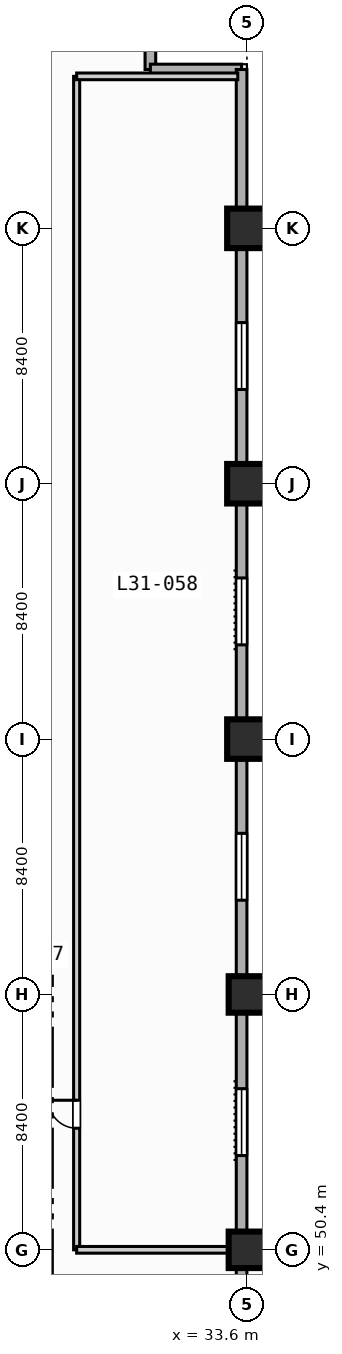
"""IFC4 building model, lengths in metres.
Left out: names, types, materials, properties, quantities, classifications, styles, units other than length and angle.
Written with IfcOpenShell. Run it as: python <this file> out.ifc"""

import sys

from ifc_helpers import new_model, si_unit, direction, frame, frame_2d, origin, origin_2d, place, context, subcontext, project, spatial, rectangle, extrude, element, fill, save


model = new_model("IFC4")
c1 = context("Model", 3, precision=1e-05, world=origin(), true_north=direction((0.0, 1.0)))
c2 = subcontext(c1, "Body", "Model", "MODEL_VIEW")
j1 = project(units=[si_unit("LENGTHUNIT", "METRE"), si_unit("PLANEANGLEUNIT", "RADIAN")], contexts=[c1])
p1 = place(None, origin())
s1 = spatial("IfcSite", under=j1, at=p1, CompositionType="ELEMENT")
p2 = place(p1, origin())
s2 = spatial("IfcBuilding", under=s1, at=p2, CompositionType="ELEMENT")
p3 = place(p2, frame((0.0, 0.0, 130.4)))
s3 = spatial("IfcBuildingStorey", under=s2, at=p3, CompositionType="ELEMENT", Elevation=130.4)
for number, where, z_axis, x_axis in (
    (1, (33.6, 50.4, 0.0), (0.0, 0.0, 1.0), (1.0, 0.0, 0.0)),
    (2, (33.6, 58.8, 0.0), (0.0, 0.0, 1.0), (1.0, 0.0, 0.0)),
):
    element("IfcColumn", number, at=place(p3, frame(where, z_axis=z_axis, x_axis=x_axis)), inside=s3, PredefinedType="COLUMN", context=c2, shape_type="SweptSolid", body=[
        extrude(rectangle(XDim=1.2, YDim=1.2, at=origin_2d()), origin(), (0.0, 0.0, 1.0), 3.8),
    ])
for number, where, z_axis, x_axis in (
    (3, (33.6, 67.2, 0.0), (0.0, 0.0, 1.0), (1.0, 0.0, 0.0)),
    (4, (33.6, 75.6, 0.0), (0.0, 0.0, 1.0), (1.0, 0.0, 0.0)),
    (5, (33.6, 84.0, 0.0), (0.0, 0.0, 1.0), (1.0, 0.0, 0.0)),
):
    element("IfcColumn", number, at=place(p3, frame(where, z_axis=z_axis, x_axis=x_axis)), inside=s3, PredefinedType="COLUMN", context=c2, shape_type="SweptSolid", body=[
        extrude(rectangle(XDim=1.3, YDim=1.3, at=origin_2d()), origin(), (0.0, 0.0, 1.0), 3.8),
    ])
for number, where, z_axis, x_axis in (
    (6, (30.425, 92.225, 0.0), (0.0, 0.0, 1.0), (0.0, -1.0, 0.0)),
    (7, (30.425, 89.225, 0.0), (0.0, 0.0, 1.0), (1.0, 0.0, 0.0)),
):
    element("IfcWall", number, at=place(p3, frame(where, z_axis=z_axis, x_axis=x_axis)), inside=s3, PredefinedType="STANDARD", context=c2, shape_type="SweptSolid", body=[
        extrude(rectangle(XDim=3.0, YDim=0.35, at=frame_2d((1.5, 0.0))), origin(), (0.0, 0.0, 1.0), 3.55),
    ])
p4 = place(p3, frame((33.425, 89.225, 0.0), z_axis=(0.0, 0.0, 1.0), x_axis=(0.0, -1.0, 0.0)))
e8 = element("IfcWall", 8, at=p4, inside=s3, PredefinedType="STANDARD", context=c2, shape_type="SweptSolid", body=[
    extrude(rectangle(XDim=55.8, YDim=0.35, at=frame_2d((27.9, 0.0))), origin(), (0.0, 0.0, 1.0), 3.55),
])
p5 = place(p4, frame((50.325, 0.0, 0.85)))
e9 = element("IfcOpeningElement", 9, at=p5, cuts=e8, PredefinedType="OPENING", context=c2, shape_type="SweptSolid", body=[
    extrude(rectangle(XDim=2.2, YDim=1.8, at=frame_2d((1.1, 0.9))), frame((0.0, 0.185, 0.0), z_axis=(0.0, -1.0, 0.0), x_axis=(1.0, 0.0, 0.0)), (0.0, 0.0, 1.0), 0.37),
])
p6 = place(p4, frame((33.525, 0.0, 0.85)))
e10 = element("IfcOpeningElement", 10, at=p6, cuts=e8, PredefinedType="OPENING", context=c2, shape_type="SweptSolid", body=[
    extrude(rectangle(XDim=2.2, YDim=1.8, at=frame_2d((1.1, 0.9))), frame((0.0, 0.185, 0.0), z_axis=(0.0, -1.0, 0.0), x_axis=(1.0, 0.0, 0.0)), (0.0, 0.0, 1.0), 0.37),
])
p7 = place(p4, frame((25.125, 0.0, 0.85)))
e11 = element("IfcOpeningElement", 11, at=p7, cuts=e8, PredefinedType="OPENING", context=c2, shape_type="SweptSolid", body=[
    extrude(rectangle(XDim=2.2, YDim=1.8, at=frame_2d((1.1, 0.9))), frame((0.0, 0.185, 0.0), z_axis=(0.0, -1.0, 0.0), x_axis=(1.0, 0.0, 0.0)), (0.0, 0.0, 1.0), 0.37),
])
p8 = place(p4, frame((16.725, 0.0, 0.85)))
e12 = element("IfcOpeningElement", 12, at=p8, cuts=e8, PredefinedType="OPENING", context=c2, shape_type="SweptSolid", body=[
    extrude(rectangle(XDim=2.2, YDim=1.8, at=frame_2d((1.1, 0.9))), frame((0.0, 0.185, 0.0), z_axis=(0.0, -1.0, 0.0), x_axis=(1.0, 0.0, 0.0)), (0.0, 0.0, 1.0), 0.37),
])
p9 = place(p4, frame((8.325, 0.0, 0.85)))
e13 = element("IfcOpeningElement", 13, at=p9, cuts=e8, PredefinedType="OPENING", context=c2, shape_type="SweptSolid", body=[
    extrude(rectangle(XDim=2.2, YDim=1.8, at=frame_2d((1.1, 0.9))), frame((0.0, 0.185, 0.0), z_axis=(0.0, -1.0, 0.0), x_axis=(1.0, 0.0, 0.0)), (0.0, 0.0, 1.0), 0.37),
])
p10 = place(p3, frame((28.0, 50.4, 0.0), z_axis=(0.0, 0.0, 1.0), x_axis=(0.0, 1.0, 0.0)))
e14 = element("IfcWall", 14, at=p10, inside=s3, PredefinedType="PARTITIONING", context=c2, shape_type="SweptSolid", body=[
    extrude(rectangle(XDim=38.6, YDim=0.2, at=frame_2d((19.3, 0.0))), origin(), (0.0, 0.0, 1.0), 3.55),
])
p11 = place(p10, frame((4.0, 0.0, 0.0)))
e15 = element("IfcOpeningElement", 15, at=p11, cuts=e14, PredefinedType="OPENING", context=c2, shape_type="SweptSolid", body=[
    extrude(rectangle(XDim=0.92, YDim=2.1, at=frame_2d((0.46, 1.05))), frame((0.0, 0.11, 0.0), z_axis=(0.0, -1.0, 0.0), x_axis=(1.0, 0.0, 0.0)), (0.0, 0.0, 1.0), 0.22),
])
p12 = place(p3, frame((28.0, 50.4, 0.0), z_axis=(0.0, 0.0, 1.0), x_axis=(1.0, 0.0, 0.0)))
e16 = element("IfcWall", 16, at=p12, inside=s3, PredefinedType="PARTITIONING", context=c2, shape_type="SweptSolid", body=[
    extrude(rectangle(XDim=5.3, YDim=0.22, at=frame_2d((2.65, 0.0))), origin(), (0.0, 0.0, 1.0), 2.8),
])
p13 = place(p3, frame((28.0, 89.0, 0.0), z_axis=(0.0, 0.0, 1.0), x_axis=(1.0, 0.0, 0.0)))
e17 = element("IfcWall", 17, at=p13, inside=s3, PredefinedType="PARTITIONING", context=c2, shape_type="SweptSolid", body=[
    extrude(rectangle(XDim=5.3, YDim=0.22, at=frame_2d((2.65, 0.0))), origin(), (0.0, 0.0, 1.0), 3.55),
])
p14 = place(p6, origin())
e18 = element("IfcWindow", 18, at=p14, inside=s3, PartitioningType="SINGLE_PANEL", PredefinedType="WINDOW", context=c2, shape_type="SweptSolid", body=[
    extrude(rectangle(XDim=2.2, YDim=1.8, at=frame_2d((1.1, 0.9))), frame((0.0, 0.03, 0.0), z_axis=(0.0, -1.0, 0.0), x_axis=(1.0, 0.0, 0.0)), (0.0, 0.0, 1.0), 0.06),
])
fill(e10, e18)
p15 = place(p7, origin())
e19 = element("IfcWindow", 19, at=p15, inside=s3, PartitioningType="SINGLE_PANEL", PredefinedType="WINDOW", context=c2, shape_type="SweptSolid", body=[
    extrude(rectangle(XDim=2.2, YDim=1.8, at=frame_2d((1.1, 0.9))), frame((0.0, 0.03, 0.0), z_axis=(0.0, -1.0, 0.0), x_axis=(1.0, 0.0, 0.0)), (0.0, 0.0, 1.0), 0.06),
])
fill(e11, e19)
p16 = place(p8, origin())
e20 = element("IfcWindow", 20, at=p16, inside=s3, PartitioningType="SINGLE_PANEL", PredefinedType="WINDOW", context=c2, shape_type="SweptSolid", body=[
    extrude(rectangle(XDim=2.2, YDim=1.8, at=frame_2d((1.1, 0.9))), frame((0.0, 0.03, 0.0), z_axis=(0.0, -1.0, 0.0), x_axis=(1.0, 0.0, 0.0)), (0.0, 0.0, 1.0), 0.06),
])
fill(e12, e20)
p17 = place(p9, origin())
e21 = element("IfcWindow", 21, at=p17, inside=s3, PartitioningType="SINGLE_PANEL", PredefinedType="WINDOW", context=c2, shape_type="SweptSolid", body=[
    extrude(rectangle(XDim=2.2, YDim=1.8, at=frame_2d((1.1, 0.9))), frame((0.0, 0.03, 0.0), z_axis=(0.0, -1.0, 0.0), x_axis=(1.0, 0.0, 0.0)), (0.0, 0.0, 1.0), 0.06),
])
fill(e13, e21)
p18 = place(p11, origin())
e22 = element("IfcDoor", 22, at=p18, inside=s3, OperationType="SINGLE_SWING_RIGHT", PredefinedType="DOOR", context=c2, shape_type="SweptSolid", body=[
    extrude(rectangle(XDim=0.92, YDim=2.1, at=frame_2d((0.46, 1.05))), frame((0.0, 0.025, 0.0), z_axis=(0.0, -1.0, 0.0), x_axis=(1.0, 0.0, 0.0)), (0.0, 0.0, 1.0), 0.05),
])
fill(e15, e22)
save(model, sys.argv[1])
